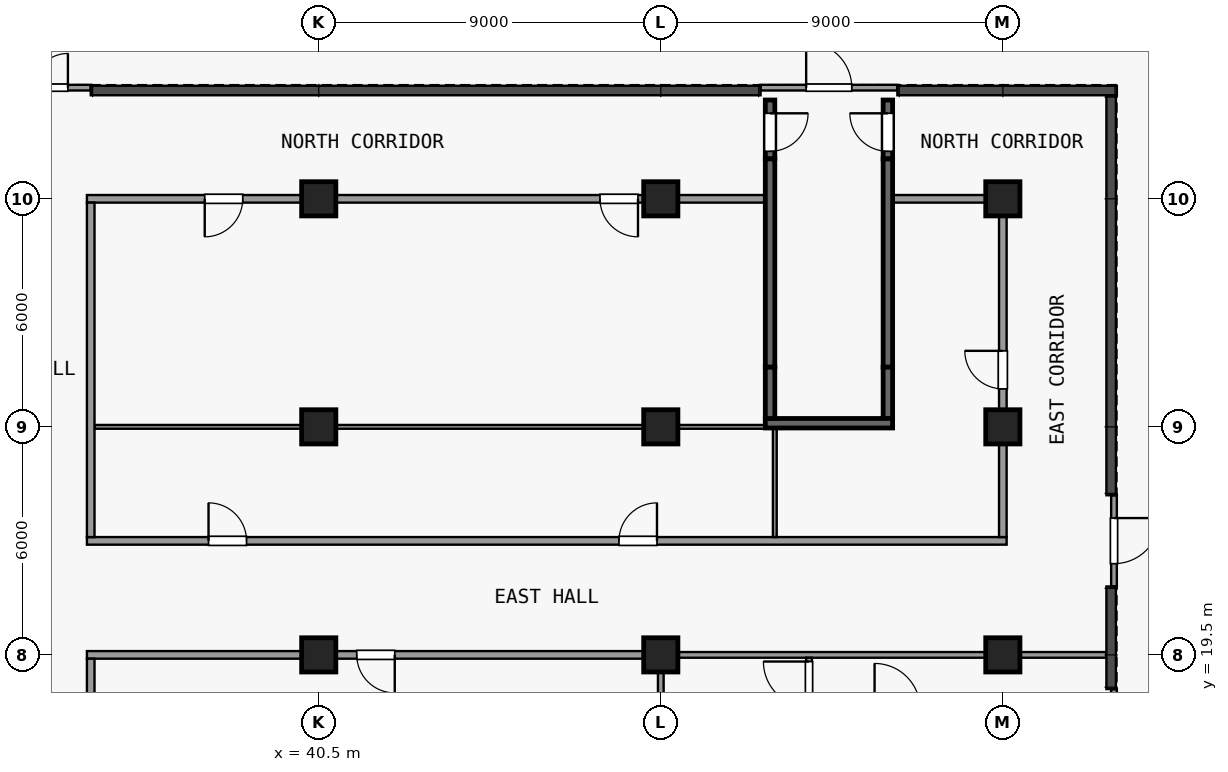
"""IFC4 building model, lengths in metres.
Left out: names, types, materials, properties, quantities, classifications, styles, units other than length and angle.
Written with IfcOpenShell. Run it as: python <this file> out.ifc"""

import sys

from ifc_helpers import new_model, si_unit, direction, frame, frame_2d, origin, origin_2d, place, context, subcontext, project, spatial, rectangle, extrude, element, fill, save


model = new_model("IFC4")
c1 = context("Model", 3, precision=1e-05, world=origin(), true_north=direction((0.0, 1.0)))
c2 = subcontext(c1, "Body", "Model", "MODEL_VIEW")
j1 = project(units=[si_unit("LENGTHUNIT", "METRE"), si_unit("PLANEANGLEUNIT", "RADIAN")], contexts=[c1])
p1 = place(None, origin())
s1 = spatial("IfcSite", under=j1, at=p1, CompositionType="ELEMENT")
p2 = place(p1, origin())
s2 = spatial("IfcBuilding", under=s1, at=p2, CompositionType="ELEMENT")
p3 = place(p2, origin())
s3 = spatial("IfcBuildingStorey", under=s2, at=p3, CompositionType="ELEMENT", Elevation=0.0)
for number, where, z_axis, x_axis in (
    (1, (40.5, 19.5, 0.0), (0.0, 0.0, 1.0), (1.0, 0.0, 0.0)),
    (2, (40.5, 25.5, 0.0), (0.0, 0.0, 1.0), (1.0, 0.0, 0.0)),
    (3, (40.5, 31.5, 0.0), (0.0, 0.0, 1.0), (1.0, 0.0, 0.0)),
    (4, (49.5, 19.5, 0.0), (0.0, 0.0, 1.0), (1.0, 0.0, 0.0)),
    (5, (49.5, 25.5, 0.0), (0.0, 0.0, 1.0), (1.0, 0.0, 0.0)),
    (6, (49.5, 31.5, 0.0), (0.0, 0.0, 1.0), (1.0, 0.0, 0.0)),
    (7, (58.5, 19.5, 0.0), (0.0, 0.0, 1.0), (1.0, 0.0, 0.0)),
    (8, (58.5, 25.5, 0.0), (0.0, 0.0, 1.0), (1.0, 0.0, 0.0)),
    (9, (58.5, 31.5, 0.0), (0.0, 0.0, 1.0), (1.0, 0.0, 0.0)),
):
    element("IfcColumn", number, at=place(p3, frame(where, z_axis=z_axis, x_axis=x_axis)), inside=s3, PredefinedType="COLUMN", context=c2, shape_type="SweptSolid", body=[
        extrude(rectangle(XDim=0.9, YDim=0.9, at=origin_2d()), origin(), (0.0, 0.0, 1.0), 8.0),
    ])
p4 = place(p3, frame((49.95, 19.5, 0.0), z_axis=(0.0, 0.0, 1.0), x_axis=(1.0, 0.0, 0.0)))
e10 = element("IfcWall", 10, at=p4, inside=s3, PredefinedType="PARTITIONING", context=c2, shape_type="SweptSolid", body=[
    extrude(rectangle(XDim=8.1, YDim=0.15, at=frame_2d((4.05, 0.0))), origin(), (0.0, 0.0, 1.0), 7.65),
])
p5 = place(p3, frame((58.95, 19.5, 0.0), z_axis=(0.0, 0.0, 1.0), x_axis=(1.0, 0.0, 0.0)))
e11 = element("IfcWall", 11, at=p5, inside=s3, PredefinedType="PARTITIONING", context=c2, shape_type="SweptSolid", body=[
    extrude(rectangle(XDim=2.275, YDim=0.15, at=frame_2d((1.138, 0.0))), origin(), (0.0, 0.0, 1.0), 7.65),
])
p6 = place(p3, frame((49.5, 13.95, 0.0), z_axis=(0.0, 0.0, 1.0), x_axis=(0.0, 1.0, 0.0)))
e12 = element("IfcWall", 12, at=p6, inside=s3, PredefinedType="PARTITIONING", context=c2, shape_type="SweptSolid", body=[
    extrude(rectangle(XDim=5.1, YDim=0.15, at=frame_2d((2.55, 0.0))), origin(), (0.0, 0.0, 1.0), 7.65),
])
p7 = place(p3, frame((53.4, 13.575, 0.0), z_axis=(0.0, 0.0, 1.0), x_axis=(0.0, 1.0, 0.0)))
e13 = element("IfcWall", 13, at=p7, inside=s3, PredefinedType="PARTITIONING", context=c2, shape_type="SweptSolid", body=[
    extrude(rectangle(XDim=5.85, YDim=0.15, at=frame_2d((2.925, 0.0))), origin(), (0.0, 0.0, 1.0), 7.65),
])
p8 = place(p7, frame((4.55, 0.0, 0.0)))
e14 = element("IfcOpeningElement", 14, at=p8, cuts=e13, PredefinedType="OPENING", context=c2, shape_type="SweptSolid", body=[
    extrude(rectangle(XDim=1.2, YDim=2.1, at=frame_2d((0.6, 1.05))), frame((0.0, 0.085, 0.0), z_axis=(0.0, -1.0, 0.0), x_axis=(1.0, 0.0, 0.0)), (0.0, 0.0, 1.0), 0.17),
])
p9 = place(p3, frame((52.125, 34.425, 0.0), z_axis=(0.0, 0.0, 1.0), x_axis=(1.0, 0.0, 0.0)))
e15 = element("IfcWall", 15, at=p9, inside=s3, PredefinedType="SOLIDWALL", context=c2, shape_type="SweptSolid", body=[
    extrude(rectangle(XDim=3.6, YDim=0.15, at=frame_2d((1.8, 0.0))), origin(), (0.0, 0.0, 1.0), 7.65),
])
p10 = place(p9, frame((1.2, 0.0, 0.0)))
e16 = element("IfcOpeningElement", 16, at=p10, cuts=e15, PredefinedType="OPENING", context=c2, shape_type="SweptSolid", body=[
    extrude(rectangle(XDim=1.2, YDim=2.4, at=frame_2d((0.6, 1.2))), frame((0.0, 0.085, 0.0), z_axis=(0.0, -1.0, 0.0), x_axis=(1.0, 0.0, 0.0)), (0.0, 0.0, 1.0), 0.17),
])
p11 = place(p3, frame((61.425, 23.7, 0.0), z_axis=(0.0, 0.0, 1.0), x_axis=(0.0, -1.0, 0.0)))
e17 = element("IfcWall", 17, at=p11, inside=s3, PredefinedType="SOLIDWALL", context=c2, shape_type="SweptSolid", body=[
    extrude(rectangle(XDim=2.4, YDim=0.15, at=frame_2d((1.2, 0.0))), origin(), (0.0, 0.0, 1.0), 7.65),
])
p12 = place(p11, frame((0.6, 0.0, 0.0)))
e18 = element("IfcOpeningElement", 18, at=p12, cuts=e17, PredefinedType="OPENING", context=c2, shape_type="SweptSolid", body=[
    extrude(rectangle(XDim=1.2, YDim=2.4, at=frame_2d((0.6, 1.2))), frame((0.0, 0.085, 0.0), z_axis=(0.0, -1.0, 0.0), x_axis=(1.0, 0.0, 0.0)), (0.0, 0.0, 1.0), 0.17),
])
p13 = place(p3, frame((61.425, 18.6, 0.0), z_axis=(0.0, 0.0, 1.0), x_axis=(0.0, -1.0, 0.0)))
e19 = element("IfcWall", 19, at=p13, inside=s3, PredefinedType="SOLIDWALL", context=c2, shape_type="SweptSolid", body=[
    extrude(rectangle(XDim=4.2, YDim=0.15, at=frame_2d((2.1, 0.0))), origin(), (0.0, 0.0, 1.0), 7.65),
])
p14 = place(p13, frame((0.6, 0.0, 0.0)))
e20 = element("IfcOpeningElement", 20, at=p14, cuts=e19, PredefinedType="OPENING", context=c2, shape_type="SweptSolid", body=[
    extrude(rectangle(XDim=3.0, YDim=4.3, at=frame_2d((1.5, 2.15))), frame((0.0, 0.085, 0.0), z_axis=(0.0, -1.0, 0.0), x_axis=(1.0, 0.0, 0.0)), (0.0, 0.0, 1.0), 0.17),
])
p15 = place(p3, frame((30.95, 34.425, 0.0), z_axis=(0.0, 0.0, 1.0), x_axis=(1.0, 0.0, 0.0)))
e21 = element("IfcWall", 21, at=p15, inside=s3, PredefinedType="SOLIDWALL", context=c2, shape_type="SweptSolid", body=[
    extrude(rectangle(XDim=3.55, YDim=0.15, at=frame_2d((1.775, 0.0))), origin(), (0.0, 0.0, 1.0), 7.65),
])
p16 = place(p15, frame((1.15, 0.0, 0.0)))
e22 = element("IfcOpeningElement", 22, at=p16, cuts=e21, PredefinedType="OPENING", context=c2, shape_type="SweptSolid", body=[
    extrude(rectangle(XDim=1.8, YDim=2.4, at=frame_2d((0.9, 1.2))), frame((0.0, 0.085, 0.0), z_axis=(0.0, -1.0, 0.0), x_axis=(1.0, 0.0, 0.0)), (0.0, 0.0, 1.0), 0.17),
])
p17 = place(p3, frame((52.375, 34.1, 0.0), z_axis=(0.0, 0.0, 1.0), x_axis=(0.0, -1.0, 0.0)))
e23 = element("IfcWall", 23, at=p17, inside=s3, PredefinedType="SHEAR", context=c2, shape_type="SweptSolid", body=[
    extrude(rectangle(XDim=1.55, YDim=0.25, at=frame_2d((0.775, 0.0))), origin(), (0.0, 0.0, 1.0), 7.65),
])
p18 = place(p17, frame((0.35, 0.0, 0.0)))
e24 = element("IfcOpeningElement", 24, at=p18, cuts=e23, PredefinedType="OPENING", context=c2, shape_type="SweptSolid", body=[
    extrude(rectangle(XDim=1.0, YDim=2.1, at=frame_2d((0.5, 1.05))), frame((0.0, 0.135, 0.0), z_axis=(0.0, -1.0, 0.0), x_axis=(1.0, 0.0, 0.0)), (0.0, 0.0, 1.0), 0.27),
])
p19 = place(p3, frame((52.375, 27.07, 0.0), z_axis=(0.0, 0.0, 1.0), x_axis=(0.0, 1.0, 0.0)))
e25 = element("IfcWall", 25, at=p19, inside=s3, PredefinedType="SHEAR", context=c2, shape_type="SweptSolid", body=[
    extrude(rectangle(XDim=5.48, YDim=0.25, at=frame_2d((2.74, 0.0))), origin(), (0.0, 0.0, 1.0), 7.65),
])
p20 = place(p3, frame((52.375, 25.72, 0.0), z_axis=(0.0, 0.0, 1.0), x_axis=(0.0, 1.0, 0.0)))
e26 = element("IfcWall", 26, at=p20, inside=s3, PredefinedType="SHEAR", context=c2, shape_type="SweptSolid", body=[
    extrude(rectangle(XDim=1.35, YDim=0.25, at=frame_2d((0.675, 0.0))), origin(), (0.0, 0.0, 1.0), 7.65),
])
p21 = place(p3, frame((55.475, 32.55, 0.0), z_axis=(0.0, 0.0, 1.0), x_axis=(0.0, 1.0, 0.0)))
e27 = element("IfcWall", 27, at=p21, inside=s3, PredefinedType="SHEAR", context=c2, shape_type="SweptSolid", body=[
    extrude(rectangle(XDim=1.55, YDim=0.25, at=frame_2d((0.775, 0.0))), origin(), (0.0, 0.0, 1.0), 7.65),
])
p22 = place(p21, frame((0.2, 0.0, 0.0)))
e28 = element("IfcOpeningElement", 28, at=p22, cuts=e27, PredefinedType="OPENING", context=c2, shape_type="SweptSolid", body=[
    extrude(rectangle(XDim=1.0, YDim=2.1, at=frame_2d((0.5, 1.05))), frame((0.0, 0.135, 0.0), z_axis=(0.0, -1.0, 0.0), x_axis=(1.0, 0.0, 0.0)), (0.0, 0.0, 1.0), 0.27),
])
p23 = place(p3, frame((55.475, 27.07, 0.0), z_axis=(0.0, 0.0, 1.0), x_axis=(0.0, 1.0, 0.0)))
e29 = element("IfcWall", 29, at=p23, inside=s3, PredefinedType="SHEAR", context=c2, shape_type="SweptSolid", body=[
    extrude(rectangle(XDim=5.48, YDim=0.25, at=frame_2d((2.74, 0.0))), origin(), (0.0, 0.0, 1.0), 7.65),
])
p24 = place(p3, frame((55.475, 25.72, 0.0), z_axis=(0.0, 0.0, 1.0), x_axis=(0.0, 1.0, 0.0)))
e30 = element("IfcWall", 30, at=p24, inside=s3, PredefinedType="SHEAR", context=c2, shape_type="SweptSolid", body=[
    extrude(rectangle(XDim=1.35, YDim=0.25, at=frame_2d((0.675, 0.0))), origin(), (0.0, 0.0, 1.0), 7.65),
])
p25 = place(p3, frame((52.25, 25.595, 0.0), z_axis=(0.0, 0.0, 1.0), x_axis=(1.0, 0.0, 0.0)))
e31 = element("IfcWall", 31, at=p25, inside=s3, PredefinedType="SHEAR", context=c2, shape_type="SweptSolid", body=[
    extrude(rectangle(XDim=3.35, YDim=0.25, at=frame_2d((1.675, 0.0))), origin(), (0.0, 0.0, 1.0), 7.65),
])
p26 = place(p3, frame((34.4, 19.5, 0.0), z_axis=(0.0, 0.0, 1.0), x_axis=(1.0, 0.0, 0.0)))
e32 = element("IfcWall", 32, at=p26, inside=s3, PredefinedType="PARTITIONING", context=c2, shape_type="SweptSolid", body=[
    extrude(rectangle(XDim=15.1, YDim=0.2, at=frame_2d((7.55, 0.0))), origin(), (0.0, 0.0, 1.0), 7.65),
])
p27 = place(p26, frame((7.1, 0.0, 0.0)))
e33 = element("IfcOpeningElement", 33, at=p27, cuts=e32, PredefinedType="OPENING", context=c2, shape_type="SweptSolid", body=[
    extrude(rectangle(XDim=1.0, YDim=2.1, at=frame_2d((0.5, 1.05))), frame((0.0, 0.11, 0.0), z_axis=(0.0, -1.0, 0.0), x_axis=(1.0, 0.0, 0.0)), (0.0, 0.0, 1.0), 0.22),
])
p28 = place(p3, frame((34.4, 22.5, 0.0), z_axis=(0.0, 0.0, 1.0), x_axis=(1.0, 0.0, 0.0)))
e34 = element("IfcWall", 34, at=p28, inside=s3, PredefinedType="PARTITIONING", context=c2, shape_type="SweptSolid", body=[
    extrude(rectangle(XDim=24.2, YDim=0.2, at=frame_2d((12.1, 0.0))), origin(), (0.0, 0.0, 1.0), 7.65),
])
p29 = place(p28, frame((3.2, 0.0, 0.0)))
e35 = element("IfcOpeningElement", 35, at=p29, cuts=e34, PredefinedType="OPENING", context=c2, shape_type="SweptSolid", body=[
    extrude(rectangle(XDim=1.0, YDim=2.1, at=frame_2d((0.5, 1.05))), frame((0.0, 0.11, 0.0), z_axis=(0.0, -1.0, 0.0), x_axis=(1.0, 0.0, 0.0)), (0.0, 0.0, 1.0), 0.22),
])
p30 = place(p28, frame((14.0, 0.0, 0.0)))
e36 = element("IfcOpeningElement", 36, at=p30, cuts=e34, PredefinedType="OPENING", context=c2, shape_type="SweptSolid", body=[
    extrude(rectangle(XDim=1.0, YDim=2.1, at=frame_2d((0.5, 1.05))), frame((0.0, 0.11, 0.0), z_axis=(0.0, -1.0, 0.0), x_axis=(1.0, 0.0, 0.0)), (0.0, 0.0, 1.0), 0.22),
])
p31 = place(p3, frame((34.6, 25.5, 0.0), z_axis=(0.0, 0.0, 1.0), x_axis=(1.0, 0.0, 0.0)))
e37 = element("IfcWall", 37, at=p31, inside=s3, PredefinedType="PARTITIONING", context=c2, shape_type="SweptSolid", body=[
    extrude(rectangle(XDim=17.65, YDim=0.1, at=frame_2d((8.825, 0.0))), origin(), (0.0, 0.0, 1.0), 7.65),
])
p32 = place(p3, frame((34.4, 31.5, 0.0), z_axis=(0.0, 0.0, 1.0), x_axis=(1.0, 0.0, 0.0)))
e38 = element("IfcWall", 38, at=p32, inside=s3, PredefinedType="PARTITIONING", context=c2, shape_type="SweptSolid", body=[
    extrude(rectangle(XDim=17.85, YDim=0.2, at=frame_2d((8.925, 0.0))), origin(), (0.0, 0.0, 1.0), 7.65),
])
p33 = place(p32, frame((3.1, 0.0, 0.0)))
e39 = element("IfcOpeningElement", 39, at=p33, cuts=e38, PredefinedType="OPENING", context=c2, shape_type="SweptSolid", body=[
    extrude(rectangle(XDim=1.0, YDim=2.1, at=frame_2d((0.5, 1.05))), frame((0.0, 0.11, 0.0), z_axis=(0.0, -1.0, 0.0), x_axis=(1.0, 0.0, 0.0)), (0.0, 0.0, 1.0), 0.22),
])
p34 = place(p32, frame((13.5, 0.0, 0.0)))
e40 = element("IfcOpeningElement", 40, at=p34, cuts=e38, PredefinedType="OPENING", context=c2, shape_type="SweptSolid", body=[
    extrude(rectangle(XDim=1.0, YDim=2.1, at=frame_2d((0.5, 1.05))), frame((0.0, 0.11, 0.0), z_axis=(0.0, -1.0, 0.0), x_axis=(1.0, 0.0, 0.0)), (0.0, 0.0, 1.0), 0.22),
])
p35 = place(p3, frame((55.6, 31.5, 0.0), z_axis=(0.0, 0.0, 1.0), x_axis=(1.0, 0.0, 0.0)))
e41 = element("IfcWall", 41, at=p35, inside=s3, PredefinedType="PARTITIONING", context=c2, shape_type="SweptSolid", body=[
    extrude(rectangle(XDim=3.0, YDim=0.2, at=frame_2d((1.5, 0.0))), origin(), (0.0, 0.0, 1.0), 7.65),
])
p36 = place(p3, frame((34.5, 16.6, 0.0), z_axis=(0.0, 0.0, 1.0), x_axis=(0.0, 1.0, 0.0)))
e42 = element("IfcWall", 42, at=p36, inside=s3, PredefinedType="PARTITIONING", context=c2, shape_type="SweptSolid", body=[
    extrude(rectangle(XDim=2.8, YDim=0.2, at=frame_2d((1.4, 0.0))), origin(), (0.0, 0.0, 1.0), 7.65),
])
p37 = place(p3, frame((34.5, 22.6, 0.0), z_axis=(0.0, 0.0, 1.0), x_axis=(0.0, 1.0, 0.0)))
e43 = element("IfcWall", 43, at=p37, inside=s3, PredefinedType="PARTITIONING", context=c2, shape_type="SweptSolid", body=[
    extrude(rectangle(XDim=8.8, YDim=0.2, at=frame_2d((4.4, 0.0))), origin(), (0.0, 0.0, 1.0), 7.65),
])
p38 = place(p3, frame((52.5, 22.6, 0.0), z_axis=(0.0, 0.0, 1.0), x_axis=(0.0, 1.0, 0.0)))
e44 = element("IfcWall", 44, at=p38, inside=s3, PredefinedType="PARTITIONING", context=c2, shape_type="SweptSolid", body=[
    extrude(rectangle(XDim=2.87, YDim=0.1, at=frame_2d((1.435, 0.0))), origin(), (0.0, 0.0, 1.0), 7.65),
])
p39 = place(p3, frame((58.5, 22.6, 0.0), z_axis=(0.0, 0.0, 1.0), x_axis=(0.0, 1.0, 0.0)))
e45 = element("IfcWall", 45, at=p39, inside=s3, PredefinedType="PARTITIONING", context=c2, shape_type="SweptSolid", body=[
    extrude(rectangle(XDim=8.8, YDim=0.2, at=frame_2d((4.4, 0.0))), origin(), (0.0, 0.0, 1.0), 7.65),
])
p40 = place(p39, frame((3.9, 0.0, 0.0)))
e46 = element("IfcOpeningElement", 46, at=p40, cuts=e45, PredefinedType="OPENING", context=c2, shape_type="SweptSolid", body=[
    extrude(rectangle(XDim=1.0, YDim=2.1, at=frame_2d((0.5, 1.05))), frame((0.0, 0.11, 0.0), z_axis=(0.0, -1.0, 0.0), x_axis=(1.0, 0.0, 0.0)), (0.0, 0.0, 1.0), 0.22),
])
p41 = place(p8, origin())
e47 = element("IfcDoor", 47, at=p41, inside=s3, OperationType="SINGLE_SWING_RIGHT", PredefinedType="DOOR", context=c2, shape_type="SweptSolid", body=[
    extrude(rectangle(XDim=1.2, YDim=2.1, at=frame_2d((0.6, 1.05))), frame((0.0, 0.025, 0.0), z_axis=(0.0, -1.0, 0.0), x_axis=(1.0, 0.0, 0.0)), (0.0, 0.0, 1.0), 0.05),
])
fill(e14, e47)
p42 = place(p10, origin())
e48 = element("IfcDoor", 48, at=p42, inside=s3, OperationType="SINGLE_SWING_LEFT", PredefinedType="DOOR", context=c2, shape_type="SweptSolid", body=[
    extrude(rectangle(XDim=1.2, YDim=2.4, at=frame_2d((0.6, 1.2))), frame((0.0, 0.025, 0.0), z_axis=(0.0, -1.0, 0.0), x_axis=(1.0, 0.0, 0.0)), (0.0, 0.0, 1.0), 0.05),
])
fill(e16, e48)
p43 = place(p12, origin())
e49 = element("IfcDoor", 49, at=p43, inside=s3, OperationType="SINGLE_SWING_LEFT", PredefinedType="DOOR", context=c2, shape_type="SweptSolid", body=[
    extrude(rectangle(XDim=1.2, YDim=2.4, at=frame_2d((0.6, 1.2))), frame((0.0, 0.025, 0.0), z_axis=(0.0, -1.0, 0.0), x_axis=(1.0, 0.0, 0.0)), (0.0, 0.0, 1.0), 0.05),
])
fill(e18, e49)
p44 = place(p16, origin())
e50 = element("IfcDoor", 50, at=p44, inside=s3, OperationType="DOUBLE_DOOR_SINGLE_SWING", PredefinedType="DOOR", context=c2, shape_type="SweptSolid", body=[
    extrude(rectangle(XDim=1.8, YDim=2.4, at=frame_2d((0.9, 1.2))), frame((0.0, 0.025, 0.0), z_axis=(0.0, -1.0, 0.0), x_axis=(1.0, 0.0, 0.0)), (0.0, 0.0, 1.0), 0.05),
])
fill(e22, e50)
p45 = place(p18, origin())
e51 = element("IfcDoor", 51, at=p45, inside=s3, OperationType="SINGLE_SWING_LEFT", PredefinedType="DOOR", context=c2, shape_type="SweptSolid", body=[
    extrude(rectangle(XDim=1.0, YDim=2.1, at=frame_2d((0.5, 1.05))), frame((0.0, 0.025, 0.0), z_axis=(0.0, -1.0, 0.0), x_axis=(1.0, 0.0, 0.0)), (0.0, 0.0, 1.0), 0.05),
])
fill(e24, e51)
p46 = place(p22, origin())
e52 = element("IfcDoor", 52, at=p46, inside=s3, OperationType="SINGLE_SWING_RIGHT", PredefinedType="DOOR", context=c2, shape_type="SweptSolid", body=[
    extrude(rectangle(XDim=1.0, YDim=2.1, at=frame_2d((0.5, 1.05))), frame((0.0, 0.025, 0.0), z_axis=(0.0, -1.0, 0.0), x_axis=(1.0, 0.0, 0.0)), (0.0, 0.0, 1.0), 0.05),
])
fill(e28, e52)
p47 = place(p27, origin())
e53 = element("IfcDoor", 53, at=p47, inside=s3, OperationType="SINGLE_SWING_RIGHT", PredefinedType="DOOR", context=c2, shape_type="SweptSolid", body=[
    extrude(rectangle(XDim=1.0, YDim=2.1, at=frame_2d((0.5, 1.05))), frame((0.0, 0.025, 0.0), z_axis=(0.0, -1.0, 0.0), x_axis=(1.0, 0.0, 0.0)), (0.0, 0.0, 1.0), 0.05),
])
fill(e33, e53)
p48 = place(p29, origin())
e54 = element("IfcDoor", 54, at=p48, inside=s3, OperationType="SINGLE_SWING_RIGHT", PredefinedType="DOOR", context=c2, shape_type="SweptSolid", body=[
    extrude(rectangle(XDim=1.0, YDim=2.1, at=frame_2d((0.5, 1.05))), frame((0.0, 0.025, 0.0), z_axis=(0.0, -1.0, 0.0), x_axis=(1.0, 0.0, 0.0)), (0.0, 0.0, 1.0), 0.05),
])
fill(e35, e54)
p49 = place(p30, origin())
e55 = element("IfcDoor", 55, at=p49, inside=s3, OperationType="SINGLE_SWING_LEFT", PredefinedType="DOOR", context=c2, shape_type="SweptSolid", body=[
    extrude(rectangle(XDim=1.0, YDim=2.1, at=frame_2d((0.5, 1.05))), frame((0.0, 0.025, 0.0), z_axis=(0.0, -1.0, 0.0), x_axis=(1.0, 0.0, 0.0)), (0.0, 0.0, 1.0), 0.05),
])
fill(e36, e55)
p50 = place(p33, origin())
e56 = element("IfcDoor", 56, at=p50, inside=s3, OperationType="SINGLE_SWING_LEFT", PredefinedType="DOOR", context=c2, shape_type="SweptSolid", body=[
    extrude(rectangle(XDim=1.0, YDim=2.1, at=frame_2d((0.5, 1.05))), frame((0.0, 0.025, 0.0), z_axis=(0.0, -1.0, 0.0), x_axis=(1.0, 0.0, 0.0)), (0.0, 0.0, 1.0), 0.05),
])
fill(e39, e56)
p51 = place(p34, origin())
e57 = element("IfcDoor", 57, at=p51, inside=s3, OperationType="SINGLE_SWING_RIGHT", PredefinedType="DOOR", context=c2, shape_type="SweptSolid", body=[
    extrude(rectangle(XDim=1.0, YDim=2.1, at=frame_2d((0.5, 1.05))), frame((0.0, 0.025, 0.0), z_axis=(0.0, -1.0, 0.0), x_axis=(1.0, 0.0, 0.0)), (0.0, 0.0, 1.0), 0.05),
])
fill(e40, e57)
p52 = place(p40, origin())
e58 = element("IfcDoor", 58, at=p52, inside=s3, OperationType="SINGLE_SWING_LEFT", PredefinedType="DOOR", context=c2, shape_type="SweptSolid", body=[
    extrude(rectangle(XDim=1.0, YDim=2.1, at=frame_2d((0.5, 1.05))), frame((0.0, 0.025, 0.0), z_axis=(0.0, -1.0, 0.0), x_axis=(1.0, 0.0, 0.0)), (0.0, 0.0, 1.0), 0.05),
])
fill(e46, e58)
save(model, sys.argv[1])
